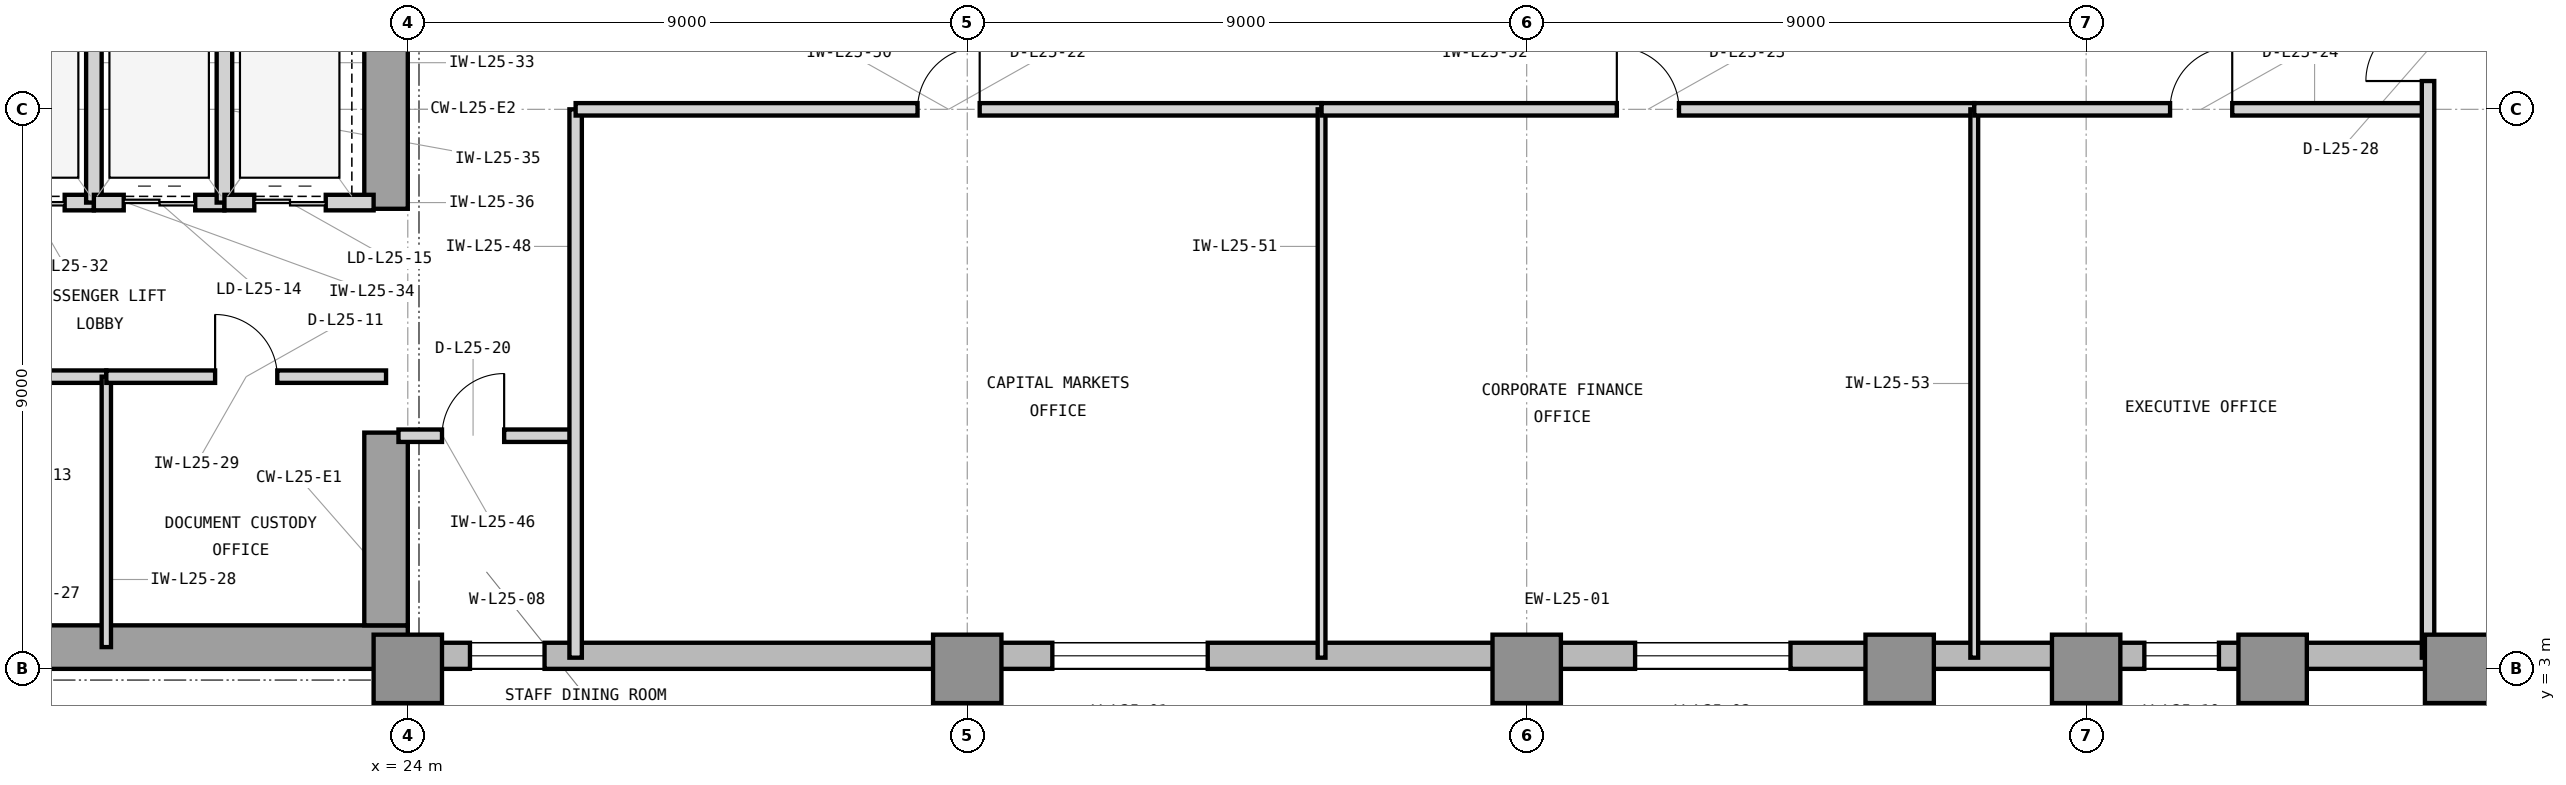
"""IFC4 building model, lengths in metres.
Left out: names, types, materials, properties, quantities, classifications, styles, units other than length and angle.
Written with IfcOpenShell. Run it as: python <this file> out.ifc"""

import sys

from ifc_helpers import new_model, si_unit, direction, frame, frame_2d, origin, origin_2d, place, context, subcontext, project, spatial, rectangle, extrude, element, fill, save


model = new_model("IFC4")
c1 = context("Model", 3, precision=1e-05, world=origin(), true_north=direction((0.0, 1.0)))
c2 = subcontext(c1, "Body", "Model", "MODEL_VIEW")
j1 = project(units=[si_unit("LENGTHUNIT", "METRE"), si_unit("PLANEANGLEUNIT", "RADIAN")], contexts=[c1])
p1 = place(None, origin())
s1 = spatial("IfcSite", under=j1, at=p1, CompositionType="ELEMENT")
p2 = place(p1, origin())
s2 = spatial("IfcBuilding", under=s1, at=p2, CompositionType="ELEMENT")
p3 = place(p2, frame((0.0, 0.0, 108.9)))
s3 = spatial("IfcBuildingStorey", under=s2, at=p3, CompositionType="ELEMENT", Elevation=108.9)
p4 = place(p3, frame((7.475, 3.35, 0.0), z_axis=(0.0, 0.0, 1.0), x_axis=(1.0, 0.0, 0.0)))
e1 = element("IfcWall", 1, at=p4, inside=s3, PredefinedType="SHEAR", context=c2, shape_type="SweptSolid", body=[
    extrude(rectangle(XDim=16.525, YDim=0.7, at=frame_2d((8.262, 0.0))), origin(), (0.0, 0.0, 1.0), 3.9),
])
p5 = place(p3, frame((23.65, 3.7, 0.0), z_axis=(0.0, 0.0, 1.0), x_axis=(0.0, 1.0, 0.0)))
e2 = element("IfcWall", 2, at=p5, inside=s3, PredefinedType="SHEAR", context=c2, shape_type="SweptSolid", body=[
    extrude(rectangle(XDim=3.1, YDim=0.7, at=frame_2d((1.55, 0.0))), origin(), (0.0, 0.0, 1.0), 3.9),
])
p6 = place(p3, frame((23.65, 10.4, 0.0), z_axis=(0.0, 0.0, 1.0), x_axis=(0.0, 1.0, 0.0)))
e3 = element("IfcWall", 3, at=p6, inside=s3, PredefinedType="SHEAR", context=c2, shape_type="SweptSolid", body=[
    extrude(rectangle(XDim=3.2, YDim=0.7, at=frame_2d((1.6, 0.0))), origin(), (0.0, 0.0, 1.0), 3.9),
])
for number, where, z_axis, x_axis in (
    (4, (24.0, 3.0, 0.0), (0.0, 0.0, 1.0), (1.0, 0.0, 0.0)),
    (5, (33.0, 3.0, 0.0), (0.0, 0.0, 1.0), (1.0, 0.0, 0.0)),
    (6, (42.0, 3.0, 0.0), (0.0, 0.0, 1.0), (1.0, 0.0, 0.0)),
    (7, (48.0, 3.0, 0.0), (0.0, 0.0, 1.0), (1.0, 0.0, 0.0)),
    (8, (51.0, 3.0, 0.0), (0.0, 0.0, 1.0), (1.0, 0.0, 0.0)),
    (9, (54.0, 3.0, 0.0), (0.0, 0.0, 1.0), (1.0, 0.0, 0.0)),
    (10, (57.0, 3.0, 0.0), (0.0, 0.0, 1.0), (1.0, 0.0, 0.0)),
):
    element("IfcColumn", number, at=place(p3, frame(where, z_axis=z_axis, x_axis=x_axis)), inside=s3, PredefinedType="COLUMN", context=c2, shape_type="SweptSolid", body=[
        extrude(rectangle(XDim=1.1, YDim=1.1, at=origin_2d()), origin(), (0.0, 0.0, 1.0), 3.9),
    ])
p7 = place(p3, frame((23.9, 3.21, 0.0), z_axis=(0.0, 0.0, 1.0), x_axis=(1.0, 0.0, 0.0)))
e11 = element("IfcWall", 11, at=p7, inside=s3, PredefinedType="STANDARD", context=c2, shape_type="SweptSolid", body=[
    extrude(rectangle(XDim=37.5, YDim=0.42, at=frame_2d((18.75, 0.0))), origin(), (0.0, 0.0, 1.0), 3.7),
])
p8 = place(p7, frame((10.469, 0.0, 0.85)))
e12 = element("IfcOpeningElement", 12, at=p8, cuts=e11, PredefinedType="OPENING", context=c2, shape_type="SweptSolid", body=[
    extrude(rectangle(XDim=2.5, YDim=2.25, at=frame_2d((1.25, 1.125))), frame((0.0, 0.22, 0.0), z_axis=(0.0, -1.0, 0.0), x_axis=(1.0, 0.0, 0.0)), (0.0, 0.0, 1.0), 0.44),
])
p9 = place(p7, frame((19.844, 0.0, 0.85)))
e13 = element("IfcOpeningElement", 13, at=p9, cuts=e11, PredefinedType="OPENING", context=c2, shape_type="SweptSolid", body=[
    extrude(rectangle(XDim=2.5, YDim=2.25, at=frame_2d((1.25, 1.125))), frame((0.0, 0.22, 0.0), z_axis=(0.0, -1.0, 0.0), x_axis=(1.0, 0.0, 0.0)), (0.0, 0.0, 1.0), 0.44),
])
p10 = place(p7, frame((1.1, 0.0, 0.85)))
e14 = element("IfcOpeningElement", 14, at=p10, cuts=e11, PredefinedType="OPENING", context=c2, shape_type="SweptSolid", body=[
    extrude(rectangle(XDim=1.2, YDim=2.25, at=frame_2d((0.6, 1.125))), frame((0.0, 0.22, 0.0), z_axis=(0.0, -1.0, 0.0), x_axis=(1.0, 0.0, 0.0)), (0.0, 0.0, 1.0), 0.44),
])
p11 = place(p7, frame((28.036, 0.0, 0.85)))
e15 = element("IfcOpeningElement", 15, at=p11, cuts=e11, PredefinedType="OPENING", context=c2, shape_type="SweptSolid", body=[
    extrude(rectangle(XDim=1.2, YDim=2.25, at=frame_2d((0.6, 1.125))), frame((0.0, 0.22, 0.0), z_axis=(0.0, -1.0, 0.0), x_axis=(1.0, 0.0, 0.0)), (0.0, 0.0, 1.0), 0.44),
])
p12 = place(p3, frame((14.7, 7.7, 0.0), z_axis=(0.0, 0.0, 1.0), x_axis=(1.0, 0.0, 0.0)))
e16 = element("IfcWall", 16, at=p12, inside=s3, PredefinedType="PARTITIONING", context=c2, shape_type="SweptSolid", body=[
    extrude(rectangle(XDim=4.45, YDim=0.2, at=frame_2d((2.225, 0.0))), origin(), (0.0, 0.0, 1.0), 3.69),
])
p13 = place(p12, frame((1.75, 0.0, 0.0)))
e17 = element("IfcOpeningElement", 17, at=p13, cuts=e16, PredefinedType="OPENING", context=c2, shape_type="SweptSolid", body=[
    extrude(rectangle(XDim=0.95, YDim=2.1, at=frame_2d((0.475, 1.05))), frame((0.0, 0.11, 0.0), z_axis=(0.0, -1.0, 0.0), x_axis=(1.0, 0.0, 0.0)), (0.0, 0.0, 1.0), 0.22),
])
p14 = place(p3, frame((19.15, 3.35, 0.0), z_axis=(0.0, 0.0, 1.0), x_axis=(0.0, 1.0, 0.0)))
e18 = element("IfcWall", 18, at=p14, inside=s3, PredefinedType="PARTITIONING", context=c2, shape_type="SweptSolid", body=[
    extrude(rectangle(XDim=4.35, YDim=0.15, at=frame_2d((2.175, 0.0))), origin(), (0.0, 0.0, 1.0), 3.69),
])
p15 = place(p3, frame((19.15, 7.7, 0.0), z_axis=(0.0, 0.0, 1.0), x_axis=(1.0, 0.0, 0.0)))
e19 = element("IfcWall", 19, at=p15, inside=s3, PredefinedType="PARTITIONING", context=c2, shape_type="SweptSolid", body=[
    extrude(rectangle(XDim=4.5, YDim=0.2, at=frame_2d((2.25, 0.0))), origin(), (0.0, 0.0, 1.0), 3.69),
])
p16 = place(p15, frame((1.75, 0.0, 0.0)))
e20 = element("IfcOpeningElement", 20, at=p16, cuts=e19, PredefinedType="OPENING", context=c2, shape_type="SweptSolid", body=[
    extrude(rectangle(XDim=1.0, YDim=2.15, at=frame_2d((0.5, 1.075))), frame((0.0, 0.11, 0.0), z_axis=(0.0, -1.0, 0.0), x_axis=(1.0, 0.0, 0.0)), (0.0, 0.0, 1.0), 0.22),
])
p17 = place(p3, frame((16.85, 10.5, 0.0), z_axis=(0.0, 0.0, 1.0), x_axis=(1.0, 0.0, 0.0)))
e21 = element("IfcWall", 21, at=p17, inside=s3, PredefinedType="PARTITIONING", context=c2, shape_type="SweptSolid", body=[
    extrude(rectangle(XDim=2.1, YDim=0.25, at=frame_2d((1.05, 0.0))), origin(), (0.0, 0.0, 1.0), 3.227),
])
p18 = place(p17, frame((0.48, 0.0, 0.0)))
e22 = element("IfcOpeningElement", 22, at=p18, cuts=e21, PredefinedType="OPENING", context=c2, shape_type="SweptSolid", body=[
    extrude(rectangle(XDim=1.15, YDim=2.25, at=frame_2d((0.575, 1.125))), frame((0.0, 0.135, 0.0), z_axis=(0.0, -1.0, 0.0), x_axis=(1.0, 0.0, 0.0)), (0.0, 0.0, 1.0), 0.27),
])
p19 = place(p3, frame((18.95, 10.5, 0.0), z_axis=(0.0, 0.0, 1.0), x_axis=(0.0, 1.0, 0.0)))
e23 = element("IfcWall", 23, at=p19, inside=s3, PredefinedType="PARTITIONING", context=c2, shape_type="SweptSolid", body=[
    extrude(rectangle(XDim=3.0, YDim=0.25, at=frame_2d((1.5, 0.0))), origin(), (0.0, 0.0, 1.0), 3.69),
])
p20 = place(p3, frame((18.95, 10.5, 0.0), z_axis=(0.0, 0.0, 1.0), x_axis=(1.0, 0.0, 0.0)))
e24 = element("IfcWall", 24, at=p20, inside=s3, PredefinedType="PARTITIONING", context=c2, shape_type="SweptSolid", body=[
    extrude(rectangle(XDim=2.1, YDim=0.25, at=frame_2d((1.05, 0.0))), origin(), (0.0, 0.0, 1.0), 3.227),
])
p21 = place(p20, frame((0.48, 0.0, 0.0)))
e25 = element("IfcOpeningElement", 25, at=p21, cuts=e24, PredefinedType="OPENING", context=c2, shape_type="SweptSolid", body=[
    extrude(rectangle(XDim=1.15, YDim=2.25, at=frame_2d((0.575, 1.125))), frame((0.0, 0.135, 0.0), z_axis=(0.0, -1.0, 0.0), x_axis=(1.0, 0.0, 0.0)), (0.0, 0.0, 1.0), 0.27),
])
p22 = place(p3, frame((21.05, 10.5, 0.0), z_axis=(0.0, 0.0, 1.0), x_axis=(0.0, 1.0, 0.0)))
e26 = element("IfcWall", 26, at=p22, inside=s3, PredefinedType="PARTITIONING", context=c2, shape_type="SweptSolid", body=[
    extrude(rectangle(XDim=3.0, YDim=0.25, at=frame_2d((1.5, 0.0))), origin(), (0.0, 0.0, 1.0), 3.69),
])
p23 = place(p3, frame((21.05, 10.5, 0.0), z_axis=(0.0, 0.0, 1.0), x_axis=(1.0, 0.0, 0.0)))
e27 = element("IfcWall", 27, at=p23, inside=s3, PredefinedType="PARTITIONING", context=c2, shape_type="SweptSolid", body=[
    extrude(rectangle(XDim=2.4, YDim=0.25, at=frame_2d((1.2, 0.0))), origin(), (0.0, 0.0, 1.0), 3.227),
])
p24 = place(p23, frame((0.48, 0.0, 0.0)))
e28 = element("IfcOpeningElement", 28, at=p24, cuts=e27, PredefinedType="OPENING", context=c2, shape_type="SweptSolid", body=[
    extrude(rectangle(XDim=1.15, YDim=2.25, at=frame_2d((0.575, 1.125))), frame((0.0, 0.135, 0.0), z_axis=(0.0, -1.0, 0.0), x_axis=(1.0, 0.0, 0.0)), (0.0, 0.0, 1.0), 0.27),
])
p25 = place(p3, frame((23.85, 6.75, 0.0), z_axis=(0.0, 0.0, 1.0), x_axis=(1.0, 0.0, 0.0)))
e29 = element("IfcWall", 29, at=p25, inside=s3, PredefinedType="PARTITIONING", context=c2, shape_type="SweptSolid", body=[
    extrude(rectangle(XDim=2.85, YDim=0.2, at=frame_2d((1.425, 0.0))), origin(), (0.0, 0.0, 1.0), 3.69),
])
p26 = place(p25, frame((0.7, 0.0, 0.0)))
e30 = element("IfcOpeningElement", 30, at=p26, cuts=e29, PredefinedType="OPENING", context=c2, shape_type="SweptSolid", body=[
    extrude(rectangle(XDim=1.0, YDim=2.15, at=frame_2d((0.5, 1.075))), frame((0.0, 0.11, 0.0), z_axis=(0.0, -1.0, 0.0), x_axis=(1.0, 0.0, 0.0)), (0.0, 0.0, 1.0), 0.22),
])
p27 = place(p3, frame((26.7, 3.18, 0.0), z_axis=(0.0, 0.0, 1.0), x_axis=(0.0, 1.0, 0.0)))
e31 = element("IfcWall", 31, at=p27, inside=s3, PredefinedType="PARTITIONING", context=c2, shape_type="SweptSolid", body=[
    extrude(rectangle(XDim=8.82, YDim=0.2, at=frame_2d((4.41, 0.0))), origin(), (0.0, 0.0, 1.0), 3.69),
])
p28 = place(p3, frame((26.7, 12.0, 0.0), z_axis=(0.0, 0.0, 1.0), x_axis=(1.0, 0.0, 0.0)))
e32 = element("IfcWall", 32, at=p28, inside=s3, PredefinedType="PARTITIONING", context=c2, shape_type="SweptSolid", body=[
    extrude(rectangle(XDim=12.0, YDim=0.2, at=frame_2d((6.0, 0.0))), origin(), (0.0, 0.0, 1.0), 3.227),
])
p29 = place(p28, frame((5.5, 0.0, 0.0)))
e33 = element("IfcOpeningElement", 33, at=p29, cuts=e32, PredefinedType="OPENING", context=c2, shape_type="SweptSolid", body=[
    extrude(rectangle(XDim=1.0, YDim=2.15, at=frame_2d((0.5, 1.075))), frame((0.0, 0.11, 0.0), z_axis=(0.0, -1.0, 0.0), x_axis=(1.0, 0.0, 0.0)), (0.0, 0.0, 1.0), 0.22),
])
p30 = place(p3, frame((38.7, 3.18, 0.0), z_axis=(0.0, 0.0, 1.0), x_axis=(0.0, 1.0, 0.0)))
e34 = element("IfcWall", 34, at=p30, inside=s3, PredefinedType="PARTITIONING", context=c2, shape_type="SweptSolid", body=[
    extrude(rectangle(XDim=8.82, YDim=0.125, at=frame_2d((4.41, 0.0))), origin(), (0.0, 0.0, 1.0), 3.69),
])
p31 = place(p3, frame((38.7, 12.0, 0.0), z_axis=(0.0, 0.0, 1.0), x_axis=(1.0, 0.0, 0.0)))
e35 = element("IfcWall", 35, at=p31, inside=s3, PredefinedType="PARTITIONING", context=c2, shape_type="SweptSolid", body=[
    extrude(rectangle(XDim=10.5, YDim=0.2, at=frame_2d((5.25, 0.0))), origin(), (0.0, 0.0, 1.0), 3.227),
])
p32 = place(p31, frame((4.75, 0.0, 0.0)))
e36 = element("IfcOpeningElement", 36, at=p32, cuts=e35, PredefinedType="OPENING", context=c2, shape_type="SweptSolid", body=[
    extrude(rectangle(XDim=1.0, YDim=2.15, at=frame_2d((0.5, 1.075))), frame((0.0, 0.11, 0.0), z_axis=(0.0, -1.0, 0.0), x_axis=(1.0, 0.0, 0.0)), (0.0, 0.0, 1.0), 0.22),
])
p33 = place(p3, frame((49.2, 3.18, 0.0), z_axis=(0.0, 0.0, 1.0), x_axis=(0.0, 1.0, 0.0)))
e37 = element("IfcWall", 37, at=p33, inside=s3, PredefinedType="PARTITIONING", context=c2, shape_type="SweptSolid", body=[
    extrude(rectangle(XDim=8.82, YDim=0.125, at=frame_2d((4.41, 0.0))), origin(), (0.0, 0.0, 1.0), 3.69),
])
p34 = place(p3, frame((49.2, 12.0, 0.0), z_axis=(0.0, 0.0, 1.0), x_axis=(1.0, 0.0, 0.0)))
e38 = element("IfcWall", 38, at=p34, inside=s3, PredefinedType="PARTITIONING", context=c2, shape_type="SweptSolid", body=[
    extrude(rectangle(XDim=7.3, YDim=0.2, at=frame_2d((3.65, 0.0))), origin(), (0.0, 0.0, 1.0), 3.227),
])
p35 = place(p34, frame((3.15, 0.0, 0.0)))
e39 = element("IfcOpeningElement", 39, at=p35, cuts=e38, PredefinedType="OPENING", context=c2, shape_type="SweptSolid", body=[
    extrude(rectangle(XDim=1.0, YDim=2.15, at=frame_2d((0.5, 1.075))), frame((0.0, 0.11, 0.0), z_axis=(0.0, -1.0, 0.0), x_axis=(1.0, 0.0, 0.0)), (0.0, 0.0, 1.0), 0.22),
])
p36 = place(p3, frame((56.5, 3.18, 0.0), z_axis=(0.0, 0.0, 1.0), x_axis=(0.0, 1.0, 0.0)))
e40 = element("IfcWall", 40, at=p36, inside=s3, PredefinedType="PARTITIONING", context=c2, shape_type="SweptSolid", body=[
    extrude(rectangle(XDim=17.64, YDim=0.2, at=frame_2d((8.82, 0.0))), origin(), (0.0, 0.0, 1.0), 3.69),
])
p37 = place(p36, frame((9.275, 0.0, 0.0)))
e41 = element("IfcOpeningElement", 41, at=p37, cuts=e40, PredefinedType="OPENING", context=c2, shape_type="SweptSolid", body=[
    extrude(rectangle(XDim=1.0, YDim=2.15, at=frame_2d((0.5, 1.075))), frame((0.0, 0.11, 0.0), z_axis=(0.0, -1.0, 0.0), x_axis=(1.0, 0.0, 0.0)), (0.0, 0.0, 1.0), 0.22),
])
p38 = place(p8, origin())
e42 = element("IfcWindow", 42, at=p38, inside=s3, PartitioningType="SINGLE_PANEL", PredefinedType="WINDOW", context=c2, shape_type="SweptSolid", body=[
    extrude(rectangle(XDim=2.5, YDim=2.25, at=frame_2d((1.25, 1.125))), frame((0.0, 0.11, 0.0), z_axis=(0.0, -1.0, 0.0), x_axis=(1.0, 0.0, 0.0)), (0.0, 0.0, 1.0), 0.06),
])
fill(e12, e42)
p39 = place(p9, origin())
e43 = element("IfcWindow", 43, at=p39, inside=s3, PartitioningType="SINGLE_PANEL", PredefinedType="WINDOW", context=c2, shape_type="SweptSolid", body=[
    extrude(rectangle(XDim=2.5, YDim=2.25, at=frame_2d((1.25, 1.125))), frame((0.0, 0.11, 0.0), z_axis=(0.0, -1.0, 0.0), x_axis=(1.0, 0.0, 0.0)), (0.0, 0.0, 1.0), 0.06),
])
fill(e13, e43)
p40 = place(p16, origin())
e44 = element("IfcDoor", 44, at=p40, inside=s3, OperationType="SINGLE_SWING_LEFT", PredefinedType="DOOR", context=c2, shape_type="SweptSolid", body=[
    extrude(rectangle(XDim=1.0, YDim=2.15, at=frame_2d((0.5, 1.075))), frame((0.0, 0.025, 0.0), z_axis=(0.0, -1.0, 0.0), x_axis=(1.0, 0.0, 0.0)), (0.0, 0.0, 1.0), 0.05),
])
fill(e20, e44)
p41 = place(p18, origin())
e45 = element("IfcDoor", 45, at=p41, inside=s3, OperationType="DOUBLE_DOOR_SLIDING", PredefinedType="DOOR", context=c2, shape_type="SweptSolid", body=[
    extrude(rectangle(XDim=1.15, YDim=2.25, at=frame_2d((0.575, 1.125))), frame((0.0, 0.025, 0.0), z_axis=(0.0, -1.0, 0.0), x_axis=(1.0, 0.0, 0.0)), (0.0, 0.0, 1.0), 0.05),
])
fill(e22, e45)
p42 = place(p21, origin())
e46 = element("IfcDoor", 46, at=p42, inside=s3, OperationType="DOUBLE_DOOR_SLIDING", PredefinedType="DOOR", context=c2, shape_type="SweptSolid", body=[
    extrude(rectangle(XDim=1.15, YDim=2.25, at=frame_2d((0.575, 1.125))), frame((0.0, 0.025, 0.0), z_axis=(0.0, -1.0, 0.0), x_axis=(1.0, 0.0, 0.0)), (0.0, 0.0, 1.0), 0.05),
])
fill(e25, e46)
p43 = place(p24, origin())
e47 = element("IfcDoor", 47, at=p43, inside=s3, OperationType="DOUBLE_DOOR_SLIDING", PredefinedType="DOOR", context=c2, shape_type="SweptSolid", body=[
    extrude(rectangle(XDim=1.15, YDim=2.25, at=frame_2d((0.575, 1.125))), frame((0.0, 0.025, 0.0), z_axis=(0.0, -1.0, 0.0), x_axis=(1.0, 0.0, 0.0)), (0.0, 0.0, 1.0), 0.05),
])
fill(e28, e47)
p44 = place(p26, origin())
e48 = element("IfcDoor", 48, at=p44, inside=s3, OperationType="SINGLE_SWING_RIGHT", PredefinedType="DOOR", context=c2, shape_type="SweptSolid", body=[
    extrude(rectangle(XDim=1.0, YDim=2.15, at=frame_2d((0.5, 1.075))), frame((0.0, 0.025, 0.0), z_axis=(0.0, -1.0, 0.0), x_axis=(1.0, 0.0, 0.0)), (0.0, 0.0, 1.0), 0.05),
])
fill(e30, e48)
p45 = place(p29, origin())
e49 = element("IfcDoor", 49, at=p45, inside=s3, OperationType="SINGLE_SWING_RIGHT", PredefinedType="DOOR", context=c2, shape_type="SweptSolid", body=[
    extrude(rectangle(XDim=1.0, YDim=2.15, at=frame_2d((0.5, 1.075))), frame((0.0, 0.025, 0.0), z_axis=(0.0, -1.0, 0.0), x_axis=(1.0, 0.0, 0.0)), (0.0, 0.0, 1.0), 0.05),
])
fill(e33, e49)
p46 = place(p32, origin())
e50 = element("IfcDoor", 50, at=p46, inside=s3, OperationType="SINGLE_SWING_LEFT", PredefinedType="DOOR", context=c2, shape_type="SweptSolid", body=[
    extrude(rectangle(XDim=1.0, YDim=2.15, at=frame_2d((0.5, 1.075))), frame((0.0, 0.025, 0.0), z_axis=(0.0, -1.0, 0.0), x_axis=(1.0, 0.0, 0.0)), (0.0, 0.0, 1.0), 0.05),
])
fill(e36, e50)
p47 = place(p35, origin())
e51 = element("IfcDoor", 51, at=p47, inside=s3, OperationType="SINGLE_SWING_RIGHT", PredefinedType="DOOR", context=c2, shape_type="SweptSolid", body=[
    extrude(rectangle(XDim=1.0, YDim=2.15, at=frame_2d((0.5, 1.075))), frame((0.0, 0.025, 0.0), z_axis=(0.0, -1.0, 0.0), x_axis=(1.0, 0.0, 0.0)), (0.0, 0.0, 1.0), 0.05),
])
fill(e39, e51)
p48 = place(p37, origin())
e52 = element("IfcDoor", 52, at=p48, inside=s3, OperationType="SINGLE_SWING_LEFT", PredefinedType="DOOR", context=c2, shape_type="SweptSolid", body=[
    extrude(rectangle(XDim=1.0, YDim=2.15, at=frame_2d((0.5, 1.075))), frame((0.0, 0.025, 0.0), z_axis=(0.0, -1.0, 0.0), x_axis=(1.0, 0.0, 0.0)), (0.0, 0.0, 1.0), 0.05),
])
fill(e41, e52)
p49 = place(p10, origin())
e53 = element("IfcWindow", 53, at=p49, inside=s3, PartitioningType="SINGLE_PANEL", PredefinedType="WINDOW", context=c2, shape_type="SweptSolid", body=[
    extrude(rectangle(XDim=1.2, YDim=2.25, at=frame_2d((0.6, 1.125))), frame((0.0, 0.11, 0.0), z_axis=(0.0, -1.0, 0.0), x_axis=(1.0, 0.0, 0.0)), (0.0, 0.0, 1.0), 0.06),
])
fill(e14, e53)
p50 = place(p11, origin())
e54 = element("IfcWindow", 54, at=p50, inside=s3, PartitioningType="SINGLE_PANEL", PredefinedType="WINDOW", context=c2, shape_type="SweptSolid", body=[
    extrude(rectangle(XDim=1.2, YDim=2.25, at=frame_2d((0.6, 1.125))), frame((0.0, 0.11, 0.0), z_axis=(0.0, -1.0, 0.0), x_axis=(1.0, 0.0, 0.0)), (0.0, 0.0, 1.0), 0.06),
])
fill(e15, e54)
save(model, sys.argv[1])
